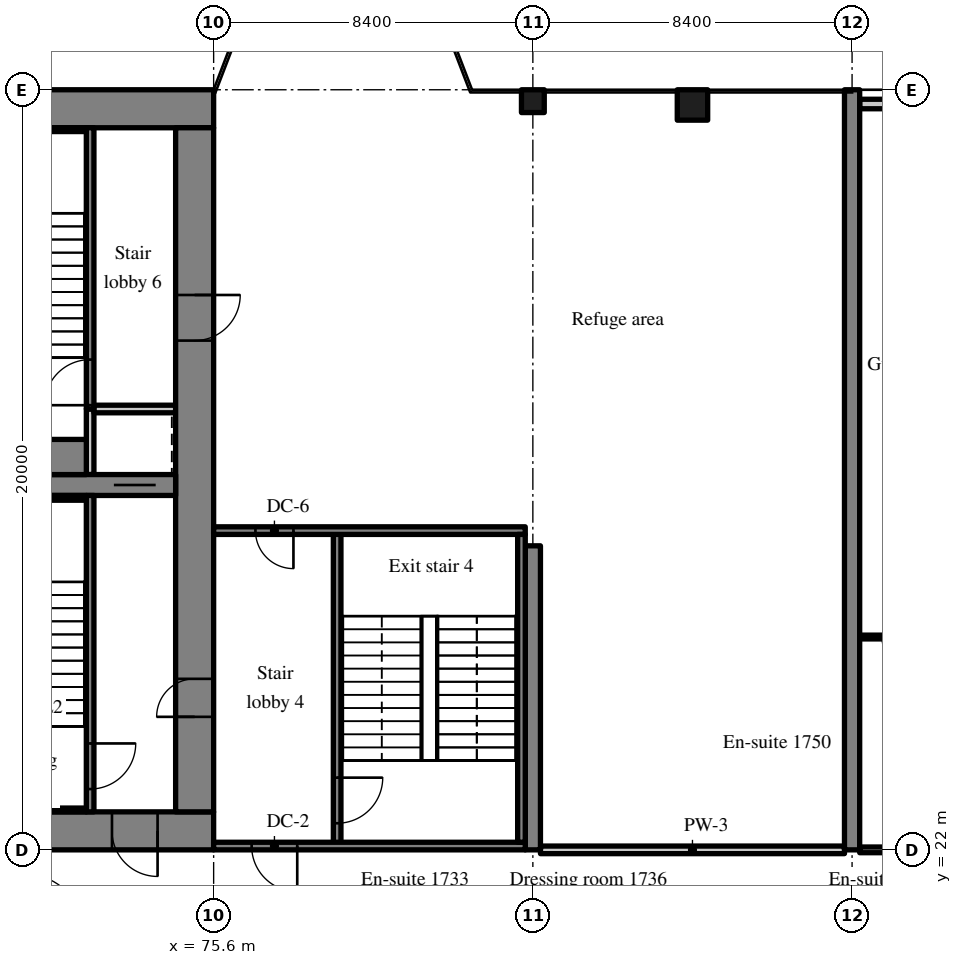
"""IFC4 building model, lengths in metres.
Left out: names, types, materials, properties, quantities, classifications, styles, units other than length and angle.
Written with IfcOpenShell. Run it as: python <this file> out.ifc"""

import sys

from ifc_helpers import new_model, si_unit, direction, frame, frame_2d, origin, origin_2d, place, context, subcontext, project, spatial, rectangle, extrude, source, transform, mapped, element, fill, save


model = new_model("IFC4")
c1 = context("Model", 3, precision=1e-05, world=origin(), true_north=direction((0.0, 1.0)))
c2 = subcontext(c1, "Body", "Model", "MODEL_VIEW")
j1 = project(units=[si_unit("LENGTHUNIT", "METRE"), si_unit("PLANEANGLEUNIT", "RADIAN")], contexts=[c1])
p1 = place(None, origin())
s1 = spatial("IfcSite", under=j1, at=p1, CompositionType="ELEMENT")
p2 = place(p1, origin())
s2 = spatial("IfcBuilding", under=s1, at=p2, CompositionType="ELEMENT")
p3 = place(p2, frame((0.0, 0.0, 73.4)))
s3 = spatial("IfcBuildingStorey", under=s2, at=p3, CompositionType="ELEMENT", Elevation=73.4)
m1 = source(origin(), c2, "Body", "SweptSolid", [
    extrude(rectangle(XDim=50.4, YDim=1.0, at=frame_2d((25.2, 0.0))), origin(), (0.0, 0.0, 1.0), 3.52),
])
p4 = place(p3, frame((25.2, 22.5, 0.0), z_axis=(0.0, 0.0, 1.0), x_axis=(1.0, 0.0, 0.0)))
e1 = element("IfcWall", 1, at=p4, inside=s3, PredefinedType="SHEAR", context=c2, shape_type="MappedRepresentation", body=[
    mapped(m1, transform((0.0, 0.0, 0.0), scale=1.0)),
])
m2 = source(origin(), c2, "Body", "SweptSolid", [
    extrude(rectangle(XDim=1.8, YDim=2.1, at=frame_2d((0.9, 1.05))), frame((0.0, 0.51, 0.0), z_axis=(0.0, -1.0, 0.0), x_axis=(1.0, 0.0, 0.0)), (0.0, 0.0, 1.0), 1.02),
])
p5 = place(p4, frame((15.9, 0.0, 0.0)))
e2 = element("IfcOpeningElement", 2, at=p5, cuts=e1, PredefinedType="OPENING", context=c2, shape_type="MappedRepresentation", body=[
    mapped(m2, transform((0.0, 0.0, 0.0), scale=1.0)),
])
m3 = source(origin(), c2, "Body", "SweptSolid", [
    extrude(rectangle(XDim=1.2, YDim=2.1, at=frame_2d((0.6, 1.05))), frame((0.0, 0.51, 0.0), z_axis=(0.0, -1.0, 0.0), x_axis=(1.0, 0.0, 0.0)), (0.0, 0.0, 1.0), 1.02),
])
p6 = place(p4, frame((26.987, 0.0, 0.0)))
e3 = element("IfcOpeningElement", 3, at=p6, cuts=e1, PredefinedType="OPENING", context=c2, shape_type="MappedRepresentation", body=[
    mapped(m3, transform((0.0, 0.0, 0.0), scale=1.0)),
])
m4 = source(origin(), c2, "Body", "SweptSolid", [
    extrude(rectangle(XDim=0.9, YDim=2.1, at=frame_2d((0.45, 1.05))), frame((0.0, 0.51, 0.0), z_axis=(0.0, -1.0, 0.0), x_axis=(1.0, 0.0, 0.0)), (0.0, 0.0, 1.0), 1.02),
])
p7 = place(p4, frame((32.25, 0.0, 0.0)))
e4 = element("IfcOpeningElement", 4, at=p7, cuts=e1, PredefinedType="OPENING", context=c2, shape_type="MappedRepresentation", body=[
    mapped(m4, transform((0.0, 0.0, 0.0), scale=1.0)),
])
p8 = place(p4, frame((38.262, 0.0, 0.0)))
e5 = element("IfcOpeningElement", 5, at=p8, cuts=e1, PredefinedType="OPENING", context=c2, shape_type="MappedRepresentation", body=[
    mapped(m4, transform((0.0, 0.0, 0.0), scale=1.0)),
])
p9 = place(p4, frame((6.438, 0.0, 0.0)))
e6 = element("IfcOpeningElement", 6, at=p9, cuts=e1, PredefinedType="OPENING", context=c2, shape_type="MappedRepresentation", body=[
    mapped(m3, transform((0.0, 0.0, 0.0), scale=1.0)),
])
p10 = place(p4, frame((47.725, 0.0, 0.0)))
e7 = element("IfcOpeningElement", 7, at=p10, cuts=e1, PredefinedType="OPENING", context=c2, shape_type="MappedRepresentation", body=[
    mapped(m3, transform((0.0, 0.0, 0.0), scale=1.0)),
])
p11 = place(p3, frame((25.2, 41.5, 0.0), z_axis=(0.0, 0.0, 1.0), x_axis=(1.0, 0.0, 0.0)))
e8 = element("IfcWall", 8, at=p11, inside=s3, PredefinedType="SHEAR", context=c2, shape_type="MappedRepresentation", body=[
    mapped(m1, transform((0.0, 0.0, 0.0), scale=1.0)),
])
m5 = source(origin(), c2, "Body", "SweptSolid", [
    extrude(rectangle(XDim=18.0, YDim=1.0, at=frame_2d((9.0, 0.0))), origin(), (0.0, 0.0, 1.0), 3.52),
])
p12 = place(p3, frame((75.1, 23.0, 0.0), z_axis=(0.0, 0.0, 1.0), x_axis=(0.0, 1.0, 0.0)))
e9 = element("IfcWall", 9, at=p12, inside=s3, PredefinedType="SHEAR", context=c2, shape_type="MappedRepresentation", body=[
    mapped(m5, transform((0.0, 0.0, 0.0), scale=1.0)),
])
m6 = source(origin(), c2, "Body", "SweptSolid", [
    extrude(rectangle(XDim=1.0, YDim=2.1, at=frame_2d((0.5, 1.05))), frame((0.0, 0.51, 0.0), z_axis=(0.0, -1.0, 0.0), x_axis=(1.0, 0.0, 0.0)), (0.0, 0.0, 1.0), 1.02),
])
p13 = place(p12, frame((2.5, 0.0, 0.0)))
e10 = element("IfcOpeningElement", 10, at=p13, cuts=e9, PredefinedType="OPENING", context=c2, shape_type="MappedRepresentation", body=[
    mapped(m6, transform((0.0, 0.0, 0.0), scale=1.0)),
])
p14 = place(p12, frame((12.4, 0.0, 0.0)))
e11 = element("IfcOpeningElement", 11, at=p14, cuts=e9, PredefinedType="OPENING", context=c2, shape_type="MappedRepresentation", body=[
    mapped(m3, transform((0.0, 0.0, 0.0), scale=1.0)),
])
m7 = source(origin(), c2, "Body", "SweptSolid", [
    extrude(rectangle(XDim=7.125, YDim=0.55, at=frame_2d((3.562, 0.0))), origin(), (0.0, 0.0, 1.0), 3.52),
])
p15 = place(p3, frame((67.475, 31.6, 0.0), z_axis=(0.0, 0.0, 1.0), x_axis=(1.0, 0.0, 0.0)))
e12 = element("IfcWall", 12, at=p15, inside=s3, PredefinedType="SHEAR", context=c2, shape_type="MappedRepresentation", body=[
    mapped(m7, transform((0.0, 0.0, 0.0), scale=1.0)),
])
m8 = source(origin(), c2, "Body", "SweptSolid", [
    extrude(rectangle(XDim=1.1, YDim=2.1, at=frame_2d((0.55, 1.05))), frame((0.0, 0.285, 0.0), z_axis=(0.0, -1.0, 0.0), x_axis=(1.0, 0.0, 0.0)), (0.0, 0.0, 1.0), 0.57),
])
p16 = place(p15, frame((5.5, 0.0, 0.0)))
e13 = element("IfcOpeningElement", 13, at=p16, cuts=e12, PredefinedType="OPENING", context=c2, shape_type="MappedRepresentation", body=[
    mapped(m8, transform((0.0, 0.0, 0.0), scale=1.0)),
])
m9 = source(origin(), c2, "Body", "SweptSolid", [
    extrude(rectangle(XDim=8.0, YDim=0.4, at=frame_2d((4.0, 0.0))), origin(), (0.0, 0.0, 1.0), 3.52),
])
p17 = place(p3, frame((84.0, 22.0, 0.0), z_axis=(0.0, 0.0, 1.0), x_axis=(0.0, 1.0, 0.0)))
e14 = element("IfcWall", 14, at=p17, inside=s3, PredefinedType="SHEAR", context=c2, shape_type="MappedRepresentation", body=[
    mapped(m9, transform((0.0, 0.0, 0.0), scale=1.0)),
])
m10 = source(origin(), c2, "Body", "SweptSolid", [
    extrude(rectangle(XDim=20.0, YDim=0.4, at=frame_2d((10.0, 0.0))), origin(), (0.0, 0.0, 1.0), 3.52),
])
p18 = place(p3, frame((92.4, 22.0, 0.0), z_axis=(0.0, 0.0, 1.0), x_axis=(0.0, 1.0, 0.0)))
e15 = element("IfcWall", 15, at=p18, inside=s3, PredefinedType="SHEAR", context=c2, shape_type="MappedRepresentation", body=[
    mapped(m10, transform((0.0, 0.0, 0.0), scale=1.0)),
])
m11 = source(origin(), c2, "Body", "SweptSolid", [
    extrude(rectangle(XDim=0.6, YDim=0.6, at=origin_2d()), origin(), (0.0, 0.0, 1.0), 3.52),
])
p19 = place(p3, frame((84.0, 41.7, 0.0), z_axis=(0.0, 0.0, 1.0), x_axis=(1.0, 0.0, 0.0)))
e16 = element("IfcColumn", 16, at=p19, inside=s3, PredefinedType="COLUMN", context=c2, shape_type="MappedRepresentation", body=[
    mapped(m11, transform((0.0, 0.0, 0.0), scale=1.0)),
])
m12 = source(origin(), c2, "Body", "SweptSolid", [
    extrude(rectangle(XDim=0.8, YDim=0.8, at=origin_2d()), origin(), (0.0, 0.0, 1.0), 3.52),
])
p20 = place(p3, frame((88.2, 41.6, 0.0), z_axis=(0.0, 0.0, 1.0), x_axis=(1.0, 0.0, 0.0)))
e17 = element("IfcColumn", 17, at=p20, inside=s3, PredefinedType="COLUMN", context=c2, shape_type="MappedRepresentation", body=[
    mapped(m12, transform((0.0, 0.0, 0.0), scale=1.0)),
])
m13 = source(origin(), c2, "Body", "SweptSolid", [
    extrude(rectangle(XDim=4.045, YDim=0.25, at=frame_2d((2.022, 0.0))), origin(), (0.0, 0.0, 1.0), 2.82),
])
p21 = place(p3, frame((96.645, 41.625, 0.0), z_axis=(0.0, 0.0, 1.0), x_axis=(-1.0, 0.0, 0.0)))
e18 = element("IfcWall", 18, at=p21, inside=s3, PredefinedType="SOLIDWALL", context=c2, shape_type="MappedRepresentation", body=[
    mapped(m13, transform((0.0, 0.0, 0.0), scale=1.0)),
])
m14 = source(origin(), c2, "Body", "SweptSolid", [
    extrude(rectangle(XDim=1.5, YDim=1.5, at=frame_2d((0.75, 0.75))), frame((0.0, 0.135, 0.0), z_axis=(0.0, -1.0, 0.0), x_axis=(1.0, 0.0, 0.0)), (0.0, 0.0, 1.0), 0.27),
])
p22 = place(p21, frame((1.272, 0.0, 0.9)))
e19 = element("IfcOpeningElement", 19, at=p22, cuts=e18, PredefinedType="OPENING", context=c2, shape_type="MappedRepresentation", body=[
    mapped(m14, transform((0.0, 0.0, 0.0), scale=1.0)),
])
m15 = source(origin(), c2, "Body", "SweptSolid", [
    extrude(rectangle(XDim=8.325, YDim=0.2, at=frame_2d((4.163, 0.0))), origin(), (0.0, 0.0, 1.0), 3.52),
])
p23 = place(p3, frame((72.35, 23.0, 0.0), z_axis=(0.0, 0.0, 1.0), x_axis=(0.0, 1.0, 0.0)))
e20 = element("IfcWall", 20, at=p23, inside=s3, PredefinedType="SOLIDWALL", context=c2, shape_type="MappedRepresentation", body=[
    mapped(m15, transform((0.0, 0.0, 0.0), scale=1.0)),
])
m16 = source(origin(), c2, "Body", "SweptSolid", [
    extrude(rectangle(XDim=1.2, YDim=2.1, at=frame_2d((0.6, 1.05))), frame((0.0, 0.11, 0.0), z_axis=(0.0, -1.0, 0.0), x_axis=(1.0, 0.0, 0.0)), (0.0, 0.0, 1.0), 0.22),
])
p24 = place(p23, frame((0.6, 0.0, 0.0)))
e21 = element("IfcOpeningElement", 21, at=p24, cuts=e20, PredefinedType="OPENING", context=c2, shape_type="MappedRepresentation", body=[
    mapped(m16, transform((0.0, 0.0, 0.0), scale=1.0)),
])
m17 = source(origin(), c2, "Body", "SweptSolid", [
    extrude(rectangle(XDim=1.725, YDim=0.2, at=frame_2d((0.863, 0.0))), origin(), (0.0, 0.0, 1.0), 3.52),
])
p25 = place(p3, frame((72.35, 31.875, 0.0), z_axis=(0.0, 0.0, 1.0), x_axis=(0.0, 1.0, 0.0)))
e22 = element("IfcWall", 22, at=p25, inside=s3, PredefinedType="SOLIDWALL", context=c2, shape_type="MappedRepresentation", body=[
    mapped(m17, transform((0.0, 0.0, 0.0), scale=1.0)),
])
m18 = source(origin(), c2, "Body", "SweptSolid", [
    extrude(rectangle(XDim=2.15, YDim=0.2, at=frame_2d((1.075, 0.0))), origin(), (0.0, 0.0, 1.0), 3.52),
])
p26 = place(p3, frame((72.45, 33.6, 0.0), z_axis=(0.0, 0.0, 1.0), x_axis=(1.0, 0.0, 0.0)))
e23 = element("IfcWall", 23, at=p26, inside=s3, PredefinedType="SOLIDWALL", context=c2, shape_type="MappedRepresentation", body=[
    mapped(m18, transform((0.0, 0.0, 0.0), scale=1.0)),
])
m19 = source(origin(), c2, "Body", "SweptSolid", [
    extrude(rectangle(XDim=7.4, YDim=0.2, at=frame_2d((3.7, 0.0))), origin(), (0.0, 0.0, 1.0), 3.52),
])
p27 = place(p3, frame((72.35, 33.6, 0.0), z_axis=(0.0, 0.0, 1.0), x_axis=(0.0, 1.0, 0.0)))
e24 = element("IfcWall", 24, at=p27, inside=s3, PredefinedType="SOLIDWALL", context=c2, shape_type="MappedRepresentation", body=[
    mapped(m19, transform((0.0, 0.0, 0.0), scale=1.0)),
])
p28 = place(p27, frame((0.1, 0.0, 0.0)))
e25 = element("IfcOpeningElement", 25, at=p28, cuts=e24, PredefinedType="OPENING", context=c2, shape_type="MappedRepresentation", body=[
    mapped(m16, transform((0.0, 0.0, 0.0), scale=1.0)),
])
m20 = source(origin(), c2, "Body", "SweptSolid", [
    extrude(rectangle(XDim=8.3, YDim=0.2, at=frame_2d((4.15, 0.0))), origin(), (0.0, 0.0, 1.0), 3.52),
])
p29 = place(p3, frame((78.85, 22.1, 0.0), z_axis=(0.0, 0.0, 1.0), x_axis=(0.0, 1.0, 0.0)))
e26 = element("IfcWall", 26, at=p29, inside=s3, PredefinedType="SOLIDWALL", context=c2, shape_type="MappedRepresentation", body=[
    mapped(m20, transform((0.0, 0.0, 0.0), scale=1.0)),
])
p30 = place(p29, frame((0.6, 0.0, 0.0)))
e27 = element("IfcOpeningElement", 27, at=p30, cuts=e26, PredefinedType="OPENING", context=c2, shape_type="MappedRepresentation", body=[
    mapped(m16, transform((0.0, 0.0, 0.0), scale=1.0)),
])
m21 = source(origin(), c2, "Body", "SweptSolid", [
    extrude(rectangle(XDim=8.2, YDim=0.2, at=frame_2d((4.1, 0.0))), origin(), (0.0, 0.0, 1.0), 3.52),
])
p31 = place(p3, frame((83.8, 22.1, 0.0), z_axis=(0.0, 0.0, 1.0), x_axis=(-1.0, 0.0, 0.0)))
e28 = element("IfcWall", 28, at=p31, inside=s3, PredefinedType="SOLIDWALL", context=c2, shape_type="MappedRepresentation", body=[
    mapped(m21, transform((0.0, 0.0, 0.0), scale=1.0)),
])
p32 = place(p31, frame((6.0, 0.0, 0.0)))
e29 = element("IfcOpeningElement", 29, at=p32, cuts=e28, PredefinedType="OPENING", context=c2, shape_type="MappedRepresentation", body=[
    mapped(m16, transform((0.0, 0.0, 0.0), scale=1.0)),
])
p33 = place(p3, frame((83.8, 30.4, 0.0), z_axis=(0.0, 0.0, 1.0), x_axis=(-1.0, 0.0, 0.0)))
e30 = element("IfcWall", 30, at=p33, inside=s3, PredefinedType="SOLIDWALL", context=c2, shape_type="MappedRepresentation", body=[
    mapped(m21, transform((0.0, 0.0, 0.0), scale=1.0)),
])
m22 = source(origin(), c2, "Body", "SweptSolid", [
    extrude(rectangle(XDim=1.0, YDim=2.1, at=frame_2d((0.5, 1.05))), frame((0.0, 0.11, 0.0), z_axis=(0.0, -1.0, 0.0), x_axis=(1.0, 0.0, 0.0)), (0.0, 0.0, 1.0), 0.22),
])
p34 = place(p33, frame((6.1, 0.0, 0.0)))
e31 = element("IfcOpeningElement", 31, at=p34, cuts=e30, PredefinedType="OPENING", context=c2, shape_type="MappedRepresentation", body=[
    mapped(m22, transform((0.0, 0.0, 0.0), scale=1.0)),
])
m23 = source(origin(), c2, "Body", "SweptSolid", [
    extrude(rectangle(XDim=4.775, YDim=0.1, at=frame_2d((2.387, 0.0))), origin(), (0.0, 0.0, 1.0), 3.52),
])
p35 = place(p3, frame((67.475, 23.05, 0.0), z_axis=(0.0, 0.0, 1.0), x_axis=(1.0, 0.0, 0.0)))
e32 = element("IfcWall", 32, at=p35, inside=s3, PredefinedType="SOLIDWALL", context=c2, shape_type="MappedRepresentation", body=[
    mapped(m23, transform((0.0, 0.0, 0.0), scale=1.0)),
])
m24 = source(origin(), c2, "Body", "SweptSolid", [
    extrude(rectangle(XDim=4.775, YDim=0.125, at=frame_2d((2.387, 0.0))), origin(), (0.0, 0.0, 1.0), 3.52),
])
p36 = place(p3, frame((67.475, 31.262, 0.0), z_axis=(0.0, 0.0, 1.0), x_axis=(1.0, 0.0, 0.0)))
e33 = element("IfcWall", 33, at=p36, inside=s3, PredefinedType="SOLIDWALL", context=c2, shape_type="MappedRepresentation", body=[
    mapped(m24, transform((0.0, 0.0, 0.0), scale=1.0)),
])
p37 = place(p3, frame((67.475, 40.95, 0.0), z_axis=(0.0, 0.0, 1.0), x_axis=(1.0, 0.0, 0.0)))
e34 = element("IfcWall", 34, at=p37, inside=s3, PredefinedType="SOLIDWALL", context=c2, shape_type="MappedRepresentation", body=[
    mapped(m23, transform((0.0, 0.0, 0.0), scale=1.0)),
])
m25 = source(origin(), c2, "Body", "SweptSolid", [
    extrude(rectangle(XDim=4.775, YDim=0.925, at=frame_2d((2.387, 0.0))), origin(), (0.0, 0.0, 1.0), 3.52),
])
p38 = place(p3, frame((67.475, 32.337, 0.0), z_axis=(0.0, 0.0, 1.0), x_axis=(1.0, 0.0, 0.0)))
e35 = element("IfcWall", 35, at=p38, inside=s3, PredefinedType="SOLIDWALL", context=c2, shape_type="MappedRepresentation", body=[
    mapped(m25, transform((0.0, 0.0, 0.0), scale=1.0)),
])
m26 = source(origin(), c2, "Body", "SweptSolid", [
    extrude(rectangle(XDim=8.1, YDim=0.2, at=frame_2d((4.05, 0.0))), origin(), (0.0, 0.0, 1.0), 3.52),
])
p39 = place(p3, frame((83.7, 22.2, 0.0), z_axis=(0.0, 0.0, 1.0), x_axis=(0.0, 1.0, 0.0)))
e36 = element("IfcWall", 36, at=p39, inside=s3, PredefinedType="SOLIDWALL", context=c2, shape_type="MappedRepresentation", body=[
    mapped(m26, transform((0.0, 0.0, 0.0), scale=1.0)),
])
m27 = source(origin(), c2, "Body", "SweptSolid", [
    extrude(rectangle(XDim=2.075, YDim=0.1, at=frame_2d((1.038, 0.0))), origin(), (0.0, 0.0, 1.0), 3.52),
])
p40 = place(p3, frame((92.6, 27.6, 0.0), z_axis=(0.0, 0.0, 1.0), x_axis=(1.0, 0.0, 0.0)))
e37 = element("IfcWall", 37, at=p40, inside=s3, PredefinedType="PARTITIONING", context=c2, shape_type="MappedRepresentation", body=[
    mapped(m27, transform((0.0, 0.0, 0.0), scale=1.0)),
])
m28 = source(origin(), c2, "Body", "SweptSolid", [
    extrude(rectangle(XDim=0.9, YDim=2.1, at=frame_2d((0.45, 1.05))), frame((0.0, 0.06, 0.0), z_axis=(0.0, -1.0, 0.0), x_axis=(1.0, 0.0, 0.0)), (0.0, 0.0, 1.0), 0.12),
])
p41 = place(p40, frame((0.587, 0.0, 0.0)))
e38 = element("IfcOpeningElement", 38, at=p41, cuts=e37, PredefinedType="OPENING", context=c2, shape_type="MappedRepresentation", body=[
    mapped(m28, transform((0.0, 0.0, 0.0), scale=1.0)),
])
m29 = source(origin(), c2, "Body", "SweptSolid", [
    extrude(rectangle(XDim=3.925, YDim=0.15, at=frame_2d((1.962, 0.0))), origin(), (0.0, 0.0, 1.0), 2.82),
])
p42 = place(p3, frame((92.6, 22.0, 0.0), z_axis=(0.0, 0.0, 1.0), x_axis=(1.0, 0.0, 0.0)))
e39 = element("IfcWall", 39, at=p42, inside=s3, PredefinedType="PARTITIONING", context=c2, shape_type="MappedRepresentation", body=[
    mapped(m29, transform((0.0, 0.0, 0.0), scale=1.0)),
])
m30 = source(origin(), c2, "Body", "SweptSolid", [
    extrude(rectangle(XDim=1.0, YDim=2.1, at=frame_2d((0.5, 1.05))), frame((0.0, 0.085, 0.0), z_axis=(0.0, -1.0, 0.0), x_axis=(1.0, 0.0, 0.0)), (0.0, 0.0, 1.0), 0.17),
])
p43 = place(p42, frame((2.525, 0.0, 0.0)))
e40 = element("IfcOpeningElement", 40, at=p43, cuts=e39, PredefinedType="OPENING", context=c2, shape_type="MappedRepresentation", body=[
    mapped(m30, transform((0.0, 0.0, 0.0), scale=1.0)),
])
m31 = source(origin(), c2, "Body", "SweptSolid", [
    extrude(rectangle(XDim=8.0, YDim=0.2, at=frame_2d((4.0, 0.0))), origin(), (0.0, 0.0, 1.0), 2.82),
])
p44 = place(p3, frame((84.2, 22.0, 0.0), z_axis=(0.0, 0.0, 1.0), x_axis=(1.0, 0.0, 0.0)))
e41 = element("IfcWall", 41, at=p44, inside=s3, PredefinedType="PARTITIONING", context=c2, shape_type="MappedRepresentation", body=[
    mapped(m31, transform((0.0, 0.0, 0.0), scale=1.0)),
])
m32 = source(origin(), c2, "Body", "SweptSolid", [
    extrude(rectangle(XDim=1.2, YDim=2.1, at=frame_2d((0.6, 1.05))), frame((0.0, 0.025, 0.0), z_axis=(0.0, -1.0, 0.0), x_axis=(1.0, 0.0, 0.0)), (0.0, 0.0, 1.0), 0.05),
])
p45 = place(p24, origin())
e42 = element("IfcDoor", 42, at=p45, inside=s3, OperationType="SINGLE_SWING_RIGHT", PredefinedType="DOOR", context=c2, shape_type="MappedRepresentation", body=[
    mapped(m32, transform((0.0, 0.0, 0.0), scale=1.0)),
])
fill(e21, e42)
m33 = source(origin(), c2, "Body", "SweptSolid", [
    extrude(rectangle(XDim=1.2, YDim=2.1, at=frame_2d((0.6, 1.05))), frame((0.0, 0.375, 0.0), z_axis=(0.0, -1.0, 0.0), x_axis=(1.0, 0.0, 0.0)), (0.0, 0.0, 1.0), 0.05),
])
p46 = place(p10, origin())
e43 = element("IfcDoor", 43, at=p46, inside=s3, OperationType="SINGLE_SWING_RIGHT", PredefinedType="DOOR", context=c2, shape_type="MappedRepresentation", body=[
    mapped(m33, transform((0.0, 0.0, 0.0), scale=1.0)),
])
fill(e7, e43)
m34 = source(origin(), c2, "Body", "SweptSolid", [
    extrude(rectangle(XDim=1.1, YDim=2.1, at=frame_2d((0.55, 1.05))), frame((0.0, 0.025, 0.0), z_axis=(0.0, -1.0, 0.0), x_axis=(1.0, 0.0, 0.0)), (0.0, 0.0, 1.0), 0.05),
])
p47 = place(p16, origin())
e44 = element("IfcDoor", 44, at=p47, inside=s3, OperationType="SLIDING_TO_RIGHT", PredefinedType="DOOR", context=c2, shape_type="MappedRepresentation", body=[
    mapped(m34, transform((0.0, 0.0, 0.0), scale=1.0)),
])
fill(e13, e44)
m35 = source(origin(), c2, "Body", "SweptSolid", [
    extrude(rectangle(XDim=1.0, YDim=2.1, at=frame_2d((0.5, 1.05))), frame((0.0, 0.025, 0.0), z_axis=(0.0, -1.0, 0.0), x_axis=(1.0, 0.0, 0.0)), (0.0, 0.0, 1.0), 0.05),
])
p48 = place(p13, origin())
e45 = element("IfcDoor", 45, at=p48, inside=s3, OperationType="SINGLE_SWING_LEFT", PredefinedType="DOOR", context=c2, shape_type="MappedRepresentation", body=[
    mapped(m35, transform((0.0, 0.0, 0.0), scale=1.0)),
])
fill(e10, e45)
p49 = place(p28, origin())
e46 = element("IfcDoor", 46, at=p49, inside=s3, OperationType="SINGLE_SWING_LEFT", PredefinedType="DOOR", context=c2, shape_type="MappedRepresentation", body=[
    mapped(m32, transform((0.0, 0.0, 0.0), scale=1.0)),
])
fill(e25, e46)
p50 = place(p14, origin())
e47 = element("IfcDoor", 47, at=p50, inside=s3, OperationType="SINGLE_SWING_RIGHT", PredefinedType="DOOR", context=c2, shape_type="MappedRepresentation", body=[
    mapped(m32, transform((0.0, 0.0, 0.0), scale=1.0)),
])
fill(e11, e47)
p51 = place(p30, origin())
e48 = element("IfcDoor", 48, at=p51, inside=s3, OperationType="SINGLE_SWING_RIGHT", PredefinedType="DOOR", context=c2, shape_type="MappedRepresentation", body=[
    mapped(m32, transform((0.0, 0.0, 0.0), scale=1.0)),
])
fill(e27, e48)
p52 = place(p32, origin())
e49 = element("IfcDoor", 49, at=p52, inside=s3, OperationType="SINGLE_SWING_LEFT", PredefinedType="DOOR", context=c2, shape_type="MappedRepresentation", body=[
    mapped(m32, transform((0.0, 0.0, 0.0), scale=1.0)),
])
fill(e29, e49)
p53 = place(p34, origin())
e50 = element("IfcDoor", 50, at=p53, inside=s3, OperationType="SINGLE_SWING_LEFT", PredefinedType="DOOR", context=c2, shape_type="MappedRepresentation", body=[
    mapped(m35, transform((0.0, 0.0, 0.0), scale=1.0)),
])
fill(e31, e50)
m36 = source(origin(), c2, "Body", "SweptSolid", [
    extrude(rectangle(XDim=0.9, YDim=2.1, at=frame_2d((0.45, 1.05))), frame((0.0, 0.025, 0.0), z_axis=(0.0, -1.0, 0.0), x_axis=(1.0, 0.0, 0.0)), (0.0, 0.0, 1.0), 0.05),
])
p54 = place(p41, origin())
e51 = element("IfcDoor", 51, at=p54, inside=s3, OperationType="SINGLE_SWING_RIGHT", PredefinedType="DOOR", context=c2, shape_type="MappedRepresentation", body=[
    mapped(m36, transform((0.0, 0.0, 0.0), scale=1.0)),
])
fill(e38, e51)
save(model, sys.argv[1])
